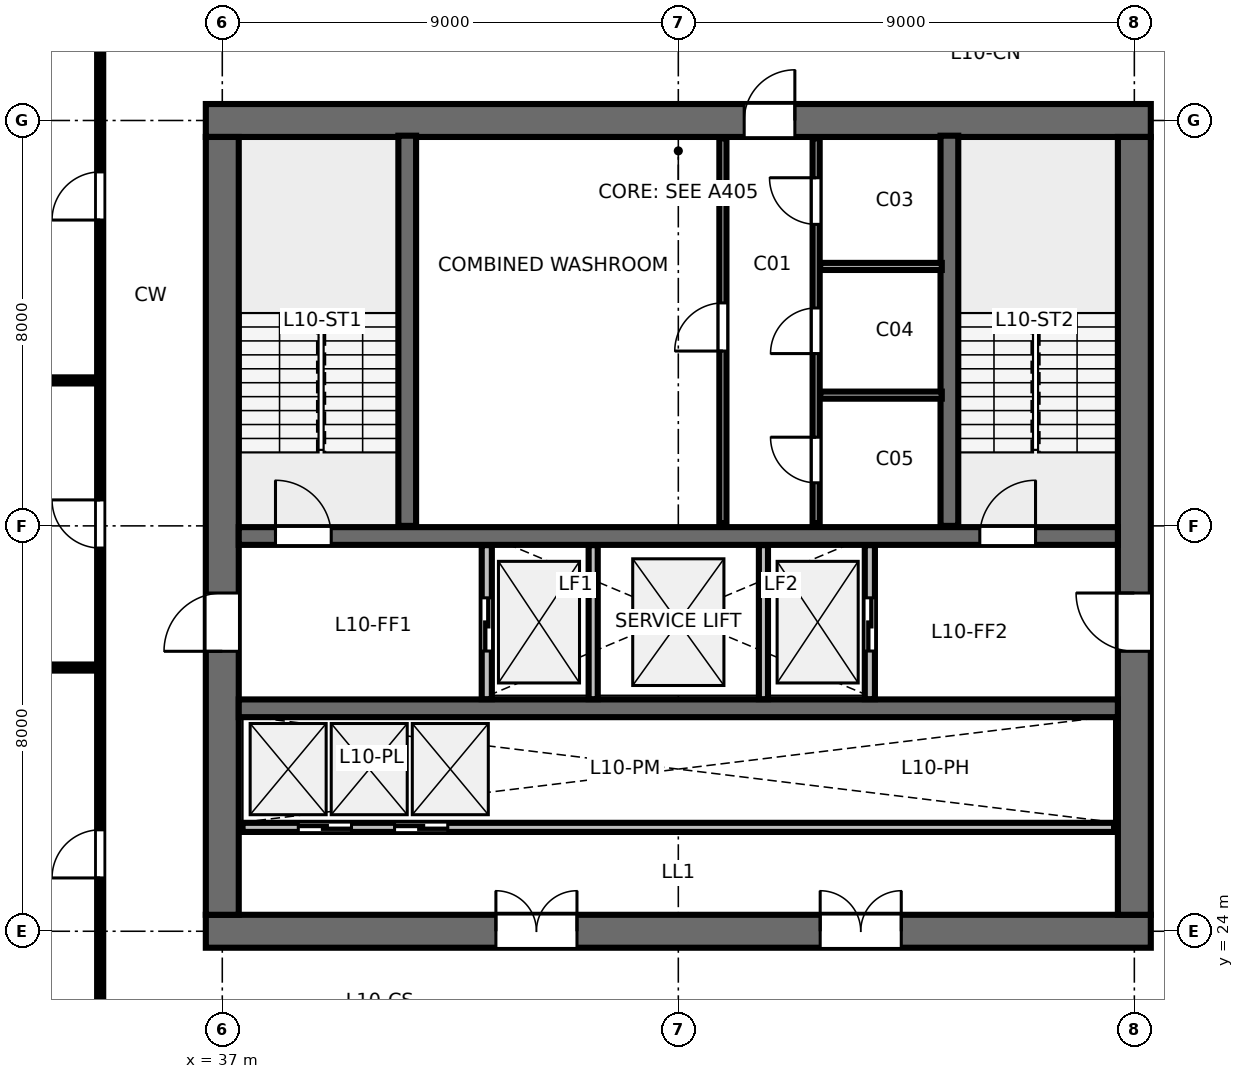
"""IFC4 building model, lengths in metres.
Left out: names, types, materials, properties, quantities, classifications, styles, units other than length and angle.
Written with IfcOpenShell. Run it as: python <this file> out.ifc"""

import sys

from ifc_helpers import new_model, si_unit, direction, frame, frame_2d, origin, place, context, subcontext, project, spatial, rectangle, extrude, element, fill, save


model = new_model("IFC4")
c1 = context("Model", 3, precision=1e-05, world=origin(), true_north=direction((0.0, 1.0)))
c2 = subcontext(c1, "Body", "Model", "MODEL_VIEW")
j1 = project(units=[si_unit("LENGTHUNIT", "METRE"), si_unit("PLANEANGLEUNIT", "RADIAN")], contexts=[c1])
p1 = place(None, origin())
s1 = spatial("IfcSite", under=j1, at=p1, CompositionType="ELEMENT")
p2 = place(p1, origin())
s2 = spatial("IfcBuilding", under=s1, at=p2, CompositionType="ELEMENT")
p3 = place(p2, frame((0.0, 0.0, 42.4)))
s3 = spatial("IfcBuildingStorey", under=s2, at=p3, CompositionType="ELEMENT", Elevation=42.4)
p4 = place(p3, frame((36.675, 24.0, 0.0), z_axis=(0.0, 0.0, 1.0), x_axis=(1.0, 0.0, 0.0)))
e1 = element("IfcWall", 1, at=p4, inside=s3, PredefinedType="SHEAR", context=c2, shape_type="SweptSolid", body=[
    extrude(rectangle(XDim=18.65, YDim=0.65, at=frame_2d((9.325, 0.0))), origin(), (0.0, 0.0, 1.0), 3.36),
])
p5 = place(p4, frame((5.725, 0.0, 0.0)))
e2 = element("IfcOpeningElement", 2, at=p5, cuts=e1, PredefinedType="OPENING", context=c2, shape_type="SweptSolid", body=[
    extrude(rectangle(XDim=1.6, YDim=2.15, at=frame_2d((0.8, 1.075))), frame((0.0, 0.335, 0.0), z_axis=(0.0, -1.0, 0.0), x_axis=(1.0, 0.0, 0.0)), (0.0, 0.0, 1.0), 0.67),
])
p6 = place(p4, frame((12.125, 0.0, 0.0)))
e3 = element("IfcOpeningElement", 3, at=p6, cuts=e1, PredefinedType="OPENING", context=c2, shape_type="SweptSolid", body=[
    extrude(rectangle(XDim=1.6, YDim=2.15, at=frame_2d((0.8, 1.075))), frame((0.0, 0.335, 0.0), z_axis=(0.0, -1.0, 0.0), x_axis=(1.0, 0.0, 0.0)), (0.0, 0.0, 1.0), 0.67),
])
p7 = place(p3, frame((36.675, 40.0, 0.0), z_axis=(0.0, 0.0, 1.0), x_axis=(1.0, 0.0, 0.0)))
e4 = element("IfcWall", 4, at=p7, inside=s3, PredefinedType="SHEAR", context=c2, shape_type="SweptSolid", body=[
    extrude(rectangle(XDim=18.65, YDim=0.65, at=frame_2d((9.325, 0.0))), origin(), (0.0, 0.0, 1.0), 3.36),
])
p8 = place(p7, frame((10.625, 0.0, 0.0)))
e5 = element("IfcOpeningElement", 5, at=p8, cuts=e4, PredefinedType="OPENING", context=c2, shape_type="SweptSolid", body=[
    extrude(rectangle(XDim=1.0, YDim=2.15, at=frame_2d((0.5, 1.075))), frame((0.0, 0.335, 0.0), z_axis=(0.0, -1.0, 0.0), x_axis=(1.0, 0.0, 0.0)), (0.0, 0.0, 1.0), 0.67),
])
p9 = place(p3, frame((37.0, 24.325, 0.0), z_axis=(0.0, 0.0, 1.0), x_axis=(0.0, 1.0, 0.0)))
e6 = element("IfcWall", 6, at=p9, inside=s3, PredefinedType="SHEAR", context=c2, shape_type="SweptSolid", body=[
    extrude(rectangle(XDim=15.35, YDim=0.65, at=frame_2d((7.675, 0.0))), origin(), (0.0, 0.0, 1.0), 3.36),
])
p10 = place(p9, frame((5.2, 0.0, 0.0)))
e7 = element("IfcOpeningElement", 7, at=p10, cuts=e6, PredefinedType="OPENING", context=c2, shape_type="SweptSolid", body=[
    extrude(rectangle(XDim=1.15, YDim=2.15, at=frame_2d((0.575, 1.075))), frame((0.0, 0.335, 0.0), z_axis=(0.0, -1.0, 0.0), x_axis=(1.0, 0.0, 0.0)), (0.0, 0.0, 1.0), 0.67),
])
p11 = place(p3, frame((55.0, 24.325, 0.0), z_axis=(0.0, 0.0, 1.0), x_axis=(0.0, 1.0, 0.0)))
e8 = element("IfcWall", 8, at=p11, inside=s3, PredefinedType="SHEAR", context=c2, shape_type="SweptSolid", body=[
    extrude(rectangle(XDim=15.35, YDim=0.65, at=frame_2d((7.675, 0.0))), origin(), (0.0, 0.0, 1.0), 3.36),
])
p12 = place(p11, frame((5.2, 0.0, 0.0)))
e9 = element("IfcOpeningElement", 9, at=p12, cuts=e8, PredefinedType="OPENING", context=c2, shape_type="SweptSolid", body=[
    extrude(rectangle(XDim=1.15, YDim=2.15, at=frame_2d((0.575, 1.075))), frame((0.0, 0.335, 0.0), z_axis=(0.0, -1.0, 0.0), x_axis=(1.0, 0.0, 0.0)), (0.0, 0.0, 1.0), 0.67),
])
p13 = place(p3, frame((37.325, 31.8, 0.0), z_axis=(0.0, 0.0, 1.0), x_axis=(1.0, 0.0, 0.0)))
e10 = element("IfcWall", 10, at=p13, inside=s3, PredefinedType="SHEAR", context=c2, shape_type="SweptSolid", body=[
    extrude(rectangle(XDim=17.35, YDim=0.35, at=frame_2d((8.675, 0.0))), origin(), (0.0, 0.0, 1.0), 3.36),
])
p14 = place(p13, frame((0.725, 0.0, 0.0)))
e11 = element("IfcOpeningElement", 11, at=p14, cuts=e10, PredefinedType="OPENING", context=c2, shape_type="SweptSolid", body=[
    extrude(rectangle(XDim=1.1, YDim=2.15, at=frame_2d((0.55, 1.075))), frame((0.0, 0.185, 0.0), z_axis=(0.0, -1.0, 0.0), x_axis=(1.0, 0.0, 0.0)), (0.0, 0.0, 1.0), 0.37),
])
p15 = place(p13, frame((14.625, 0.0, 0.0)))
e12 = element("IfcOpeningElement", 12, at=p15, cuts=e10, PredefinedType="OPENING", context=c2, shape_type="SweptSolid", body=[
    extrude(rectangle(XDim=1.1, YDim=2.15, at=frame_2d((0.55, 1.075))), frame((0.0, 0.185, 0.0), z_axis=(0.0, -1.0, 0.0), x_axis=(1.0, 0.0, 0.0)), (0.0, 0.0, 1.0), 0.37),
])
p16 = place(p3, frame((37.325, 28.4, 0.0), z_axis=(0.0, 0.0, 1.0), x_axis=(1.0, 0.0, 0.0)))
e13 = element("IfcWall", 13, at=p16, inside=s3, PredefinedType="SHEAR", context=c2, shape_type="SweptSolid", body=[
    extrude(rectangle(XDim=17.35, YDim=0.35, at=frame_2d((8.675, 0.0))), origin(), (0.0, 0.0, 1.0), 3.36),
])
for number, where, z_axis, x_axis in (
    (14, (40.65, 32.0, 0.0), (0.0, 0.0, 1.0), (0.0, 1.0, 0.0)),
    (15, (51.35, 32.0, 0.0), (0.0, 0.0, 1.0), (0.0, 1.0, 0.0)),
):
    element("IfcWall", number, at=place(p3, frame(where, z_axis=z_axis, x_axis=x_axis)), inside=s3, PredefinedType="SHEAR", context=c2, shape_type="SweptSolid", body=[
        extrude(rectangle(XDim=7.7, YDim=0.35, at=frame_2d((3.85, 0.0))), origin(), (0.0, 0.0, 1.0), 3.6),
    ])
p17 = place(p3, frame((46.88, 32.05, 0.0), z_axis=(0.0, 0.0, 1.0), x_axis=(0.0, 1.0, 0.0)))
e16 = element("IfcWall", 16, at=p17, inside=s3, PredefinedType="PARTITIONING", context=c2, shape_type="SweptSolid", body=[
    extrude(rectangle(XDim=7.6, YDim=0.14, at=frame_2d((3.8, 0.0))), origin(), (0.0, 0.0, 1.0), 3.15),
])
p18 = place(p17, frame((3.4, 0.0, 0.0)))
e17 = element("IfcOpeningElement", 17, at=p18, cuts=e16, PredefinedType="OPENING", context=c2, shape_type="SweptSolid", body=[
    extrude(rectangle(XDim=0.95, YDim=2.15, at=frame_2d((0.475, 1.075))), frame((0.0, 0.08, 0.0), z_axis=(0.0, -1.0, 0.0), x_axis=(1.0, 0.0, 0.0)), (0.0, 0.0, 1.0), 0.16),
])
p19 = place(p3, frame((48.72, 32.05, 0.0), z_axis=(0.0, 0.0, 1.0), x_axis=(0.0, 1.0, 0.0)))
e18 = element("IfcWall", 18, at=p19, inside=s3, PredefinedType="PARTITIONING", context=c2, shape_type="SweptSolid", body=[
    extrude(rectangle(XDim=7.6, YDim=0.14, at=frame_2d((3.8, 0.0))), origin(), (0.0, 0.0, 1.0), 3.15),
])
p20 = place(p19, frame((0.8, 0.0, 0.0)))
e19 = element("IfcOpeningElement", 19, at=p20, cuts=e18, PredefinedType="OPENING", context=c2, shape_type="SweptSolid", body=[
    extrude(rectangle(XDim=0.9, YDim=2.15, at=frame_2d((0.45, 1.075))), frame((0.0, 0.08, 0.0), z_axis=(0.0, -1.0, 0.0), x_axis=(1.0, 0.0, 0.0)), (0.0, 0.0, 1.0), 0.16),
])
p21 = place(p19, frame((3.35, 0.0, 0.0)))
e20 = element("IfcOpeningElement", 20, at=p21, cuts=e18, PredefinedType="OPENING", context=c2, shape_type="SweptSolid", body=[
    extrude(rectangle(XDim=0.9, YDim=2.15, at=frame_2d((0.45, 1.075))), frame((0.0, 0.08, 0.0), z_axis=(0.0, -1.0, 0.0), x_axis=(1.0, 0.0, 0.0)), (0.0, 0.0, 1.0), 0.16),
])
p22 = place(p19, frame((5.9, 0.0, 0.0)))
e21 = element("IfcOpeningElement", 21, at=p22, cuts=e18, PredefinedType="OPENING", context=c2, shape_type="SweptSolid", body=[
    extrude(rectangle(XDim=0.92, YDim=2.15, at=frame_2d((0.46, 1.075))), frame((0.0, 0.08, 0.0), z_axis=(0.0, -1.0, 0.0), x_axis=(1.0, 0.0, 0.0)), (0.0, 0.0, 1.0), 0.16),
])
for number, where, z_axis, x_axis in (
    (22, (48.8, 34.58, 0.0), (0.0, 0.0, 1.0), (1.0, 0.0, 0.0)),
    (23, (48.8, 37.12, 0.0), (0.0, 0.0, 1.0), (1.0, 0.0, 0.0)),
):
    element("IfcWall", number, at=place(p3, frame(where, z_axis=z_axis, x_axis=x_axis)), inside=s3, PredefinedType="PARTITIONING", context=c2, shape_type="SweptSolid", body=[
        extrude(rectangle(XDim=2.4, YDim=0.14, at=frame_2d((1.2, 0.0))), origin(), (0.0, 0.0, 1.0), 3.15),
    ])
p23 = place(p3, frame((42.22, 28.58, 0.0), z_axis=(0.0, 0.0, 1.0), x_axis=(0.0, 1.0, 0.0)))
e24 = element("IfcWall", 24, at=p23, inside=s3, PredefinedType="PARTITIONING", context=c2, shape_type="SweptSolid", body=[
    extrude(rectangle(XDim=3.04, YDim=0.2, at=frame_2d((1.52, 0.0))), origin(), (0.0, 0.0, 1.0), 3.15),
])
p24 = place(p23, frame((0.95, 0.0, 0.0)))
e25 = element("IfcOpeningElement", 25, at=p24, cuts=e24, PredefinedType="OPENING", context=c2, shape_type="SweptSolid", body=[
    extrude(rectangle(XDim=1.05, YDim=2.15, at=frame_2d((0.525, 1.075))), frame((0.0, 0.11, 0.0), z_axis=(0.0, -1.0, 0.0), x_axis=(1.0, 0.0, 0.0)), (0.0, 0.0, 1.0), 0.22),
])
p25 = place(p3, frame((49.78, 28.58, 0.0), z_axis=(0.0, 0.0, 1.0), x_axis=(0.0, 1.0, 0.0)))
e26 = element("IfcWall", 26, at=p25, inside=s3, PredefinedType="PARTITIONING", context=c2, shape_type="SweptSolid", body=[
    extrude(rectangle(XDim=3.04, YDim=0.2, at=frame_2d((1.52, 0.0))), origin(), (0.0, 0.0, 1.0), 3.15),
])
p26 = place(p25, frame((0.95, 0.0, 0.0)))
e27 = element("IfcOpeningElement", 27, at=p26, cuts=e26, PredefinedType="OPENING", context=c2, shape_type="SweptSolid", body=[
    extrude(rectangle(XDim=1.05, YDim=2.15, at=frame_2d((0.525, 1.075))), frame((0.0, 0.11, 0.0), z_axis=(0.0, -1.0, 0.0), x_axis=(1.0, 0.0, 0.0)), (0.0, 0.0, 1.0), 0.22),
])
for number, where, z_axis, x_axis in (
    (28, (44.32, 28.58, 0.0), (0.0, 0.0, 1.0), (0.0, 1.0, 0.0)),
    (29, (47.68, 28.58, 0.0), (0.0, 0.0, 1.0), (0.0, 1.0, 0.0)),
):
    element("IfcWall", number, at=place(p3, frame(where, z_axis=z_axis, x_axis=x_axis)), inside=s3, PredefinedType="PARTITIONING", context=c2, shape_type="SweptSolid", body=[
        extrude(rectangle(XDim=3.04, YDim=0.18, at=frame_2d((1.52, 0.0))), origin(), (0.0, 0.0, 1.0), 3.15),
    ])
p27 = place(p3, frame((37.4, 26.05, 0.0), z_axis=(0.0, 0.0, 1.0), x_axis=(1.0, 0.0, 0.0)))
e30 = element("IfcWall", 30, at=p27, inside=s3, PredefinedType="PARTITIONING", context=c2, shape_type="SweptSolid", body=[
    extrude(rectangle(XDim=17.2, YDim=0.18, at=frame_2d((8.6, 0.0))), origin(), (0.0, 0.0, 1.0), 3.15),
])
p28 = place(p27, frame((1.1, 0.0, 0.0)))
e31 = element("IfcOpeningElement", 31, at=p28, cuts=e30, PredefinedType="OPENING", context=c2, shape_type="SweptSolid", body=[
    extrude(rectangle(XDim=1.05, YDim=2.15, at=frame_2d((0.525, 1.075))), frame((0.0, 0.1, 0.0), z_axis=(0.0, -1.0, 0.0), x_axis=(1.0, 0.0, 0.0)), (0.0, 0.0, 1.0), 0.2),
])
p29 = place(p27, frame((3.0, 0.0, 0.0)))
e32 = element("IfcOpeningElement", 32, at=p29, cuts=e30, PredefinedType="OPENING", context=c2, shape_type="SweptSolid", body=[
    extrude(rectangle(XDim=1.05, YDim=2.15, at=frame_2d((0.525, 1.075))), frame((0.0, 0.1, 0.0), z_axis=(0.0, -1.0, 0.0), x_axis=(1.0, 0.0, 0.0)), (0.0, 0.0, 1.0), 0.2),
])
p30 = place(p3, frame((34.59, 29.204, 0.0), z_axis=(0.0, 0.0, 1.0), x_axis=(-1.0, 0.0, 0.0)))
e33 = element("IfcWall", 33, at=p30, inside=s3, PredefinedType="PARTITIONING", context=c2, shape_type="SweptSolid", body=[
    extrude(rectangle(XDim=12.36, YDim=0.12, at=frame_2d((6.18, 0.0))), origin(), (0.0, 0.0, 1.0), 2.43),
])
p31 = place(p30, frame((1.4, 0.0, 0.0)))
e34 = element("IfcOpeningElement", 34, at=p31, cuts=e33, PredefinedType="OPENING", context=c2, shape_type="SweptSolid", body=[
    extrude(rectangle(XDim=0.9, YDim=2.15, at=frame_2d((0.45, 1.075))), frame((0.0, 0.07, 0.0), z_axis=(0.0, -1.0, 0.0), x_axis=(1.0, 0.0, 0.0)), (0.0, 0.0, 1.0), 0.14),
])
p32 = place(p3, frame((34.59, 34.871, 0.0), z_axis=(0.0, 0.0, 1.0), x_axis=(-1.0, 0.0, 0.0)))
e35 = element("IfcWall", 35, at=p32, inside=s3, PredefinedType="PARTITIONING", context=c2, shape_type="SweptSolid", body=[
    extrude(rectangle(XDim=12.36, YDim=0.12, at=frame_2d((6.18, 0.0))), origin(), (0.0, 0.0, 1.0), 2.43),
])
p33 = place(p32, frame((1.4, 0.0, 0.0)))
e36 = element("IfcOpeningElement", 36, at=p33, cuts=e35, PredefinedType="OPENING", context=c2, shape_type="SweptSolid", body=[
    extrude(rectangle(XDim=0.9, YDim=2.15, at=frame_2d((0.45, 1.075))), frame((0.0, 0.07, 0.0), z_axis=(0.0, -1.0, 0.0), x_axis=(1.0, 0.0, 0.0)), (0.0, 0.0, 1.0), 0.14),
])
p34 = place(p3, frame((34.59, 21.65, 0.0), z_axis=(0.0, 0.0, 1.0), x_axis=(0.0, 1.0, 0.0)))
e37 = element("IfcWall", 37, at=p34, inside=s3, PredefinedType="PARTITIONING", context=c2, shape_type="SweptSolid", body=[
    extrude(rectangle(XDim=20.7, YDim=0.12, at=frame_2d((10.35, 0.0))), origin(), (0.0, 0.0, 1.0), 2.43),
])
p35 = place(p34, frame((3.402, 0.0, 0.0)))
e38 = element("IfcOpeningElement", 38, at=p35, cuts=e37, PredefinedType="OPENING", context=c2, shape_type="SweptSolid", body=[
    extrude(rectangle(XDim=0.95, YDim=2.15, at=frame_2d((0.475, 1.075))), frame((0.0, 0.07, 0.0), z_axis=(0.0, -1.0, 0.0), x_axis=(1.0, 0.0, 0.0)), (0.0, 0.0, 1.0), 0.14),
])
p36 = place(p34, frame((9.912, 0.0, 0.0)))
e39 = element("IfcOpeningElement", 39, at=p36, cuts=e37, PredefinedType="OPENING", context=c2, shape_type="SweptSolid", body=[
    extrude(rectangle(XDim=0.95, YDim=2.15, at=frame_2d((0.475, 1.075))), frame((0.0, 0.07, 0.0), z_axis=(0.0, -1.0, 0.0), x_axis=(1.0, 0.0, 0.0)), (0.0, 0.0, 1.0), 0.14),
])
p37 = place(p34, frame((16.385, 0.0, 0.0)))
e40 = element("IfcOpeningElement", 40, at=p37, cuts=e37, PredefinedType="OPENING", context=c2, shape_type="SweptSolid", body=[
    extrude(rectangle(XDim=0.95, YDim=2.15, at=frame_2d((0.475, 1.075))), frame((0.0, 0.07, 0.0), z_axis=(0.0, -1.0, 0.0), x_axis=(1.0, 0.0, 0.0)), (0.0, 0.0, 1.0), 0.14),
])
p38 = place(p14, origin())
e41 = element("IfcDoor", 41, at=p38, inside=s3, OperationType="SINGLE_SWING_LEFT", PredefinedType="DOOR", context=c2, shape_type="SweptSolid", body=[
    extrude(rectangle(XDim=1.1, YDim=2.15, at=frame_2d((0.55, 1.075))), frame((0.0, 0.025, 0.0), z_axis=(0.0, -1.0, 0.0), x_axis=(1.0, 0.0, 0.0)), (0.0, 0.0, 1.0), 0.05),
])
fill(e11, e41)
p39 = place(p15, origin())
e42 = element("IfcDoor", 42, at=p39, inside=s3, OperationType="SINGLE_SWING_RIGHT", PredefinedType="DOOR", context=c2, shape_type="SweptSolid", body=[
    extrude(rectangle(XDim=1.1, YDim=2.15, at=frame_2d((0.55, 1.075))), frame((0.0, 0.025, 0.0), z_axis=(0.0, -1.0, 0.0), x_axis=(1.0, 0.0, 0.0)), (0.0, 0.0, 1.0), 0.05),
])
fill(e12, e42)
p40 = place(p8, origin())
e43 = element("IfcDoor", 43, at=p40, inside=s3, OperationType="SINGLE_SWING_RIGHT", PredefinedType="DOOR", context=c2, shape_type="SweptSolid", body=[
    extrude(rectangle(XDim=1.0, YDim=2.15, at=frame_2d((0.5, 1.075))), frame((0.0, 0.025, 0.0), z_axis=(0.0, -1.0, 0.0), x_axis=(1.0, 0.0, 0.0)), (0.0, 0.0, 1.0), 0.05),
])
fill(e5, e43)
p41 = place(p10, origin())
e44 = element("IfcDoor", 44, at=p41, inside=s3, OperationType="SINGLE_SWING_LEFT", PredefinedType="DOOR", context=c2, shape_type="SweptSolid", body=[
    extrude(rectangle(XDim=1.15, YDim=2.15, at=frame_2d((0.575, 1.075))), frame((0.0, 0.025, 0.0), z_axis=(0.0, -1.0, 0.0), x_axis=(1.0, 0.0, 0.0)), (0.0, 0.0, 1.0), 0.05),
])
fill(e7, e44)
p42 = place(p12, origin())
e45 = element("IfcDoor", 45, at=p42, inside=s3, OperationType="SINGLE_SWING_RIGHT", PredefinedType="DOOR", context=c2, shape_type="SweptSolid", body=[
    extrude(rectangle(XDim=1.15, YDim=2.15, at=frame_2d((0.575, 1.075))), frame((0.0, 0.025, 0.0), z_axis=(0.0, -1.0, 0.0), x_axis=(1.0, 0.0, 0.0)), (0.0, 0.0, 1.0), 0.05),
])
fill(e9, e45)
p43 = place(p5, origin())
e46 = element("IfcDoor", 46, at=p43, inside=s3, OperationType="DOUBLE_DOOR_SINGLE_SWING", PredefinedType="DOOR", context=c2, shape_type="SweptSolid", body=[
    extrude(rectangle(XDim=1.6, YDim=2.15, at=frame_2d((0.8, 1.075))), frame((0.0, 0.025, 0.0), z_axis=(0.0, -1.0, 0.0), x_axis=(1.0, 0.0, 0.0)), (0.0, 0.0, 1.0), 0.05),
])
fill(e2, e46)
p44 = place(p6, origin())
e47 = element("IfcDoor", 47, at=p44, inside=s3, OperationType="DOUBLE_DOOR_SINGLE_SWING", PredefinedType="DOOR", context=c2, shape_type="SweptSolid", body=[
    extrude(rectangle(XDim=1.6, YDim=2.15, at=frame_2d((0.8, 1.075))), frame((0.0, 0.025, 0.0), z_axis=(0.0, -1.0, 0.0), x_axis=(1.0, 0.0, 0.0)), (0.0, 0.0, 1.0), 0.05),
])
fill(e3, e47)
p45 = place(p18, origin())
e48 = element("IfcDoor", 48, at=p45, inside=s3, OperationType="SINGLE_SWING_LEFT", PredefinedType="DOOR", context=c2, shape_type="SweptSolid", body=[
    extrude(rectangle(XDim=0.95, YDim=2.15, at=frame_2d((0.475, 1.075))), frame((0.0, 0.025, 0.0), z_axis=(0.0, -1.0, 0.0), x_axis=(1.0, 0.0, 0.0)), (0.0, 0.0, 1.0), 0.05),
])
fill(e17, e48)
p46 = place(p20, origin())
e49 = element("IfcDoor", 49, at=p46, inside=s3, OperationType="SINGLE_SWING_RIGHT", PredefinedType="DOOR", context=c2, shape_type="SweptSolid", body=[
    extrude(rectangle(XDim=0.9, YDim=2.15, at=frame_2d((0.45, 1.075))), frame((0.0, 0.025, 0.0), z_axis=(0.0, -1.0, 0.0), x_axis=(1.0, 0.0, 0.0)), (0.0, 0.0, 1.0), 0.05),
])
fill(e19, e49)
p47 = place(p21, origin())
e50 = element("IfcDoor", 50, at=p47, inside=s3, OperationType="SINGLE_SWING_LEFT", PredefinedType="DOOR", context=c2, shape_type="SweptSolid", body=[
    extrude(rectangle(XDim=0.9, YDim=2.15, at=frame_2d((0.45, 1.075))), frame((0.0, 0.025, 0.0), z_axis=(0.0, -1.0, 0.0), x_axis=(1.0, 0.0, 0.0)), (0.0, 0.0, 1.0), 0.05),
])
fill(e20, e50)
p48 = place(p22, origin())
e51 = element("IfcDoor", 51, at=p48, inside=s3, OperationType="SINGLE_SWING_RIGHT", PredefinedType="DOOR", context=c2, shape_type="SweptSolid", body=[
    extrude(rectangle(XDim=0.92, YDim=2.15, at=frame_2d((0.46, 1.075))), frame((0.0, 0.025, 0.0), z_axis=(0.0, -1.0, 0.0), x_axis=(1.0, 0.0, 0.0)), (0.0, 0.0, 1.0), 0.05),
])
fill(e21, e51)
p49 = place(p24, origin())
e52 = element("IfcDoor", 52, at=p49, inside=s3, OperationType="SLIDING_TO_LEFT", PredefinedType="DOOR", context=c2, shape_type="SweptSolid", body=[
    extrude(rectangle(XDim=1.05, YDim=2.15, at=frame_2d((0.525, 1.075))), frame((0.0, 0.025, 0.0), z_axis=(0.0, -1.0, 0.0), x_axis=(1.0, 0.0, 0.0)), (0.0, 0.0, 1.0), 0.05),
])
fill(e25, e52)
p50 = place(p26, origin())
e53 = element("IfcDoor", 53, at=p50, inside=s3, OperationType="SLIDING_TO_RIGHT", PredefinedType="DOOR", context=c2, shape_type="SweptSolid", body=[
    extrude(rectangle(XDim=1.05, YDim=2.15, at=frame_2d((0.525, 1.075))), frame((0.0, 0.025, 0.0), z_axis=(0.0, -1.0, 0.0), x_axis=(1.0, 0.0, 0.0)), (0.0, 0.0, 1.0), 0.05),
])
fill(e27, e53)
p51 = place(p28, origin())
e54 = element("IfcDoor", 54, at=p51, inside=s3, OperationType="SLIDING_TO_LEFT", PredefinedType="DOOR", context=c2, shape_type="SweptSolid", body=[
    extrude(rectangle(XDim=1.05, YDim=2.15, at=frame_2d((0.525, 1.075))), frame((0.0, 0.025, 0.0), z_axis=(0.0, -1.0, 0.0), x_axis=(1.0, 0.0, 0.0)), (0.0, 0.0, 1.0), 0.05),
])
fill(e31, e54)
p52 = place(p29, origin())
e55 = element("IfcDoor", 55, at=p52, inside=s3, OperationType="SLIDING_TO_RIGHT", PredefinedType="DOOR", context=c2, shape_type="SweptSolid", body=[
    extrude(rectangle(XDim=1.05, YDim=2.15, at=frame_2d((0.525, 1.075))), frame((0.0, 0.025, 0.0), z_axis=(0.0, -1.0, 0.0), x_axis=(1.0, 0.0, 0.0)), (0.0, 0.0, 1.0), 0.05),
])
fill(e32, e55)
p53 = place(p35, origin())
e56 = element("IfcDoor", 56, at=p53, inside=s3, OperationType="SINGLE_SWING_LEFT", PredefinedType="DOOR", context=c2, shape_type="SweptSolid", body=[
    extrude(rectangle(XDim=0.95, YDim=2.15, at=frame_2d((0.475, 1.075))), frame((0.0, 0.025, 0.0), z_axis=(0.0, -1.0, 0.0), x_axis=(1.0, 0.0, 0.0)), (0.0, 0.0, 1.0), 0.05),
])
fill(e38, e56)
p54 = place(p36, origin())
e57 = element("IfcDoor", 57, at=p54, inside=s3, OperationType="SINGLE_SWING_RIGHT", PredefinedType="DOOR", context=c2, shape_type="SweptSolid", body=[
    extrude(rectangle(XDim=0.95, YDim=2.15, at=frame_2d((0.475, 1.075))), frame((0.0, 0.025, 0.0), z_axis=(0.0, -1.0, 0.0), x_axis=(1.0, 0.0, 0.0)), (0.0, 0.0, 1.0), 0.05),
])
fill(e39, e57)
p55 = place(p37, origin())
e58 = element("IfcDoor", 58, at=p55, inside=s3, OperationType="SINGLE_SWING_LEFT", PredefinedType="DOOR", context=c2, shape_type="SweptSolid", body=[
    extrude(rectangle(XDim=0.95, YDim=2.15, at=frame_2d((0.475, 1.075))), frame((0.0, 0.025, 0.0), z_axis=(0.0, -1.0, 0.0), x_axis=(1.0, 0.0, 0.0)), (0.0, 0.0, 1.0), 0.05),
])
fill(e40, e58)
save(model, sys.argv[1])
